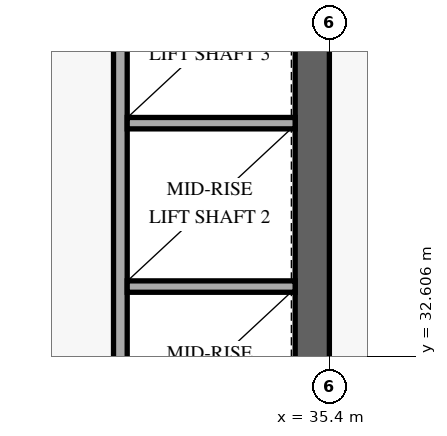
"""IFC4 building model, lengths in metres.
Left out: names, types, materials, properties, quantities, classifications, styles, units other than length and angle.
Written with IfcOpenShell. Run it as: python <this file> out.ifc"""

import sys

from ifc_helpers import new_model, si_unit, direction, frame, frame_2d, origin, place, context, subcontext, project, spatial, rectangle, extrude, element, save


model = new_model("IFC4")
c1 = context("Model", 3, precision=1e-05, world=origin(), true_north=direction((0.0, 1.0)))
c2 = subcontext(c1, "Body", "Model", "MODEL_VIEW")
j1 = project(units=[si_unit("LENGTHUNIT", "METRE"), si_unit("PLANEANGLEUNIT", "RADIAN")], contexts=[c1])
p1 = place(None, origin())
s1 = spatial("IfcSite", under=j1, at=p1, CompositionType="ELEMENT")
p2 = place(p1, origin())
s2 = spatial("IfcBuilding", under=s1, at=p2, CompositionType="ELEMENT")
p3 = place(p2, frame((0.0, 0.0, 4.8)))
s3 = spatial("IfcBuildingStorey", under=s2, at=p3, CompositionType="ELEMENT", Elevation=4.8)
p4 = place(p3, frame((35.175, 31.35, 0.0), z_axis=(0.0, 0.0, 1.0), x_axis=(0.0, 1.0, 0.0)))
e1 = element("IfcWall", 1, at=p4, inside=s3, PredefinedType="SHEAR", context=c2, shape_type="SweptSolid", body=[
    extrude(rectangle(XDim=6.9, YDim=0.45, at=frame_2d((3.45, 0.0))), origin(), (0.0, 0.0, 1.0), 3.75),
])
p5 = place(p3, frame((32.65, 31.35, 0.0), z_axis=(0.0, 0.0, 1.0), x_axis=(0.0, 1.0, 0.0)))
e2 = element("IfcWall", 2, at=p5, inside=s3, PredefinedType="STANDARD", context=c2, shape_type="SweptSolid", body=[
    extrude(rectangle(XDim=7.175, YDim=0.18, at=frame_2d((3.587, 0.0))), origin(), (0.0, 0.0, 1.0), 4.52),
])
for number, where, z_axis, x_axis in (
    (3, (32.74, 33.52, 0.0), (0.0, 0.0, 1.0), (1.0, 0.0, 0.0)),
    (4, (32.74, 35.67, 0.0), (0.0, 0.0, 1.0), (1.0, 0.0, 0.0)),
):
    element("IfcWall", number, at=place(p3, frame(where, z_axis=z_axis, x_axis=x_axis)), inside=s3, PredefinedType="STANDARD", context=c2, shape_type="SweptSolid", body=[
        extrude(rectangle(XDim=2.21, YDim=0.15, at=frame_2d((1.105, 0.0))), origin(), (0.0, 0.0, 1.0), 4.52),
    ])
save(model, sys.argv[1])
